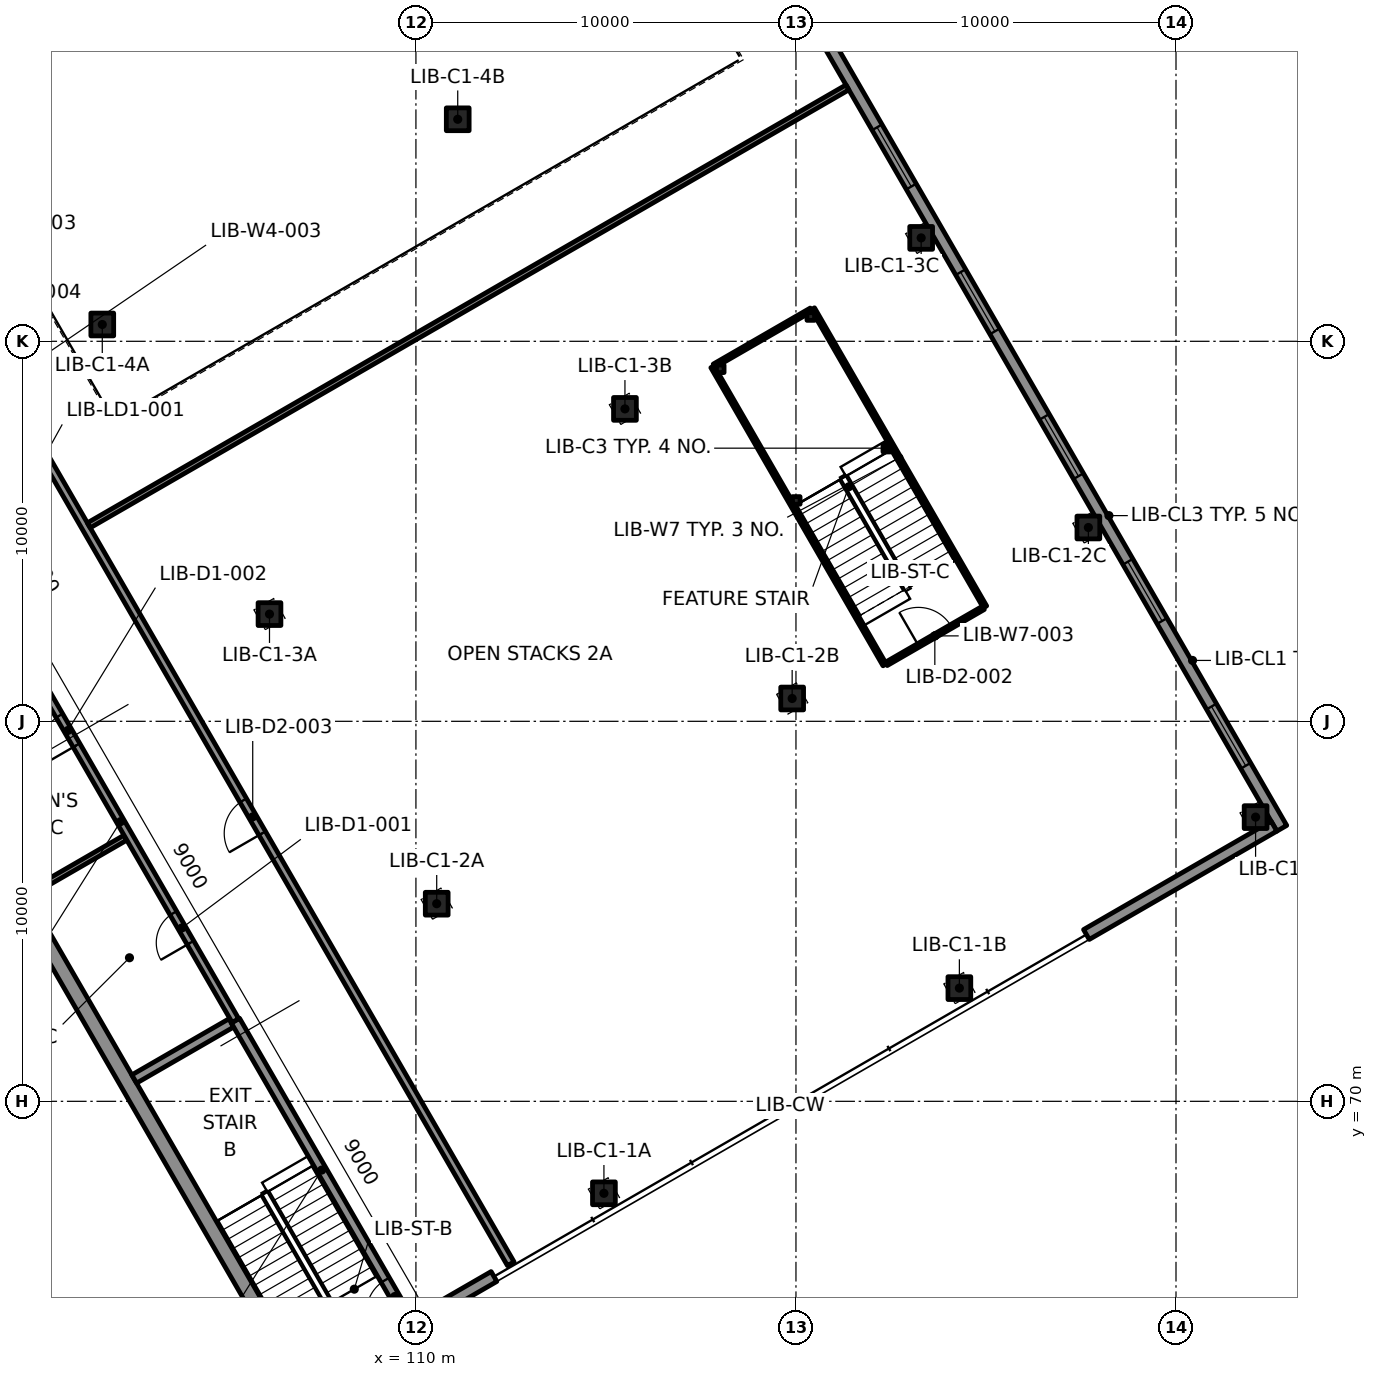
"""IFC4 building model, lengths in metres.
Left out: names, types, materials, properties, quantities, classifications, styles, units other than length and angle.
Written with IfcOpenShell. Run it as: python <this file> out.ifc"""

import sys

from ifc_helpers import new_model, si_unit, direction, frame, frame_2d, origin, origin_2d, place, context, subcontext, project, spatial, rectangle, extrude, element, fill, save


model = new_model("IFC4")
c1 = context("Model", 3, precision=1e-05, world=origin(), true_north=direction((0.0, 1.0)))
c2 = subcontext(c1, "Body", "Model", "MODEL_VIEW")
j1 = project(units=[si_unit("LENGTHUNIT", "METRE"), si_unit("PLANEANGLEUNIT", "RADIAN")], contexts=[c1])
p1 = place(None, origin())
s1 = spatial("IfcSite", under=j1, at=p1, CompositionType="ELEMENT")
p2 = place(p1, origin())
s2 = spatial("IfcBuilding", under=s1, at=p2, CompositionType="ELEMENT")
p3 = place(p2, frame((0.0, 0.0, 12.6)))
s3 = spatial("IfcBuildingStorey", under=s2, at=p3, CompositionType="ELEMENT", Elevation=12.6)
p4 = place(p3, frame((101.821, 68.315, -0.0), z_axis=(0.0, 0.0, 1.0), x_axis=(-0.5, 0.866025403784, 0.0)))
e1 = element("IfcColumn", 1, at=p4, inside=s3, PredefinedType="COLUMN", context=c2, shape_type="SweptSolid", body=[
    extrude(rectangle(XDim=1.2, YDim=1.5, at=origin_2d()), origin(), (0.0, 0.0, 1.0), 4.6),
])
p5 = place(p3, frame((103.019, 59.863, 0.0), z_axis=(0.0, 0.0, 1.0), x_axis=(-0.866027754727, 0.499995928025, 0.0)))
e2 = element("IfcWall", 2, at=p5, inside=s3, PredefinedType="PARTITIONING", context=c2, shape_type="SweptSolid", body=[
    extrude(rectangle(XDim=13.214, YDim=0.15, at=frame_2d((6.607, 0.0))), origin(), (0.0, 0.0, 1.0), 3.7),
])
for number, where, z_axis, x_axis in (
    (3, (114.947, 67.579, -0.36), (0.0, 0.0, 1.0), (1.0, 0.0, 0.0)),
    (4, (124.3, 72.979, -0.36), (0.0, 0.0, 1.0), (1.0, 0.0, 0.0)),
    (5, (132.094, 77.479, -0.36), (0.0, 0.0, 1.0), (1.0, 0.0, 0.0)),
    (6, (110.547, 75.2, -0.36), (0.0, 0.0, 1.0), (1.0, 0.0, 0.0)),
    (7, (119.9, 80.6, -0.36), (0.0, 0.0, 1.0), (1.0, 0.0, 0.0)),
    (8, (127.694, 85.1, -0.36), (0.0, 0.0, 1.0), (1.0, 0.0, 0.0)),
    (9, (106.147, 82.821, -0.36), (0.0, 0.0, 1.0), (1.0, 0.0, 0.0)),
    (10, (115.5, 88.221, -0.36), (0.0, 0.0, 1.0), (1.0, 0.0, 0.0)),
    (11, (123.294, 92.721, -0.36), (0.0, 0.0, 1.0), (1.0, 0.0, 0.0)),
    (12, (101.747, 90.442, -0.36), (0.0, 0.0, 1.0), (1.0, 0.0, 0.0)),
    (13, (111.1, 95.842, -0.36), (0.0, 0.0, 1.0), (1.0, 0.0, 0.0)),
):
    element("IfcColumn", number, at=place(p3, frame(where, z_axis=z_axis, x_axis=x_axis)), inside=s3, PredefinedType="COLUMN", context=c2, shape_type="SweptSolid", body=[
        extrude(rectangle(XDim=0.6, YDim=0.6, at=origin_2d()), origin(), (0.0, 0.0, 1.0), 4.6),
    ])
for number, where, z_axis, x_axis in (
    (14, (122.39, 87.188, -2.3), (0.0, 0.0, 1.0), (1.0, 0.0, 0.0)),
    (15, (120.008, 85.813, -2.3), (0.0, 0.0, 1.0), (1.0, 0.0, 0.0)),
    (16, (120.39, 90.652, -2.3), (0.0, 0.0, 1.0), (1.0, 0.0, 0.0)),
    (17, (118.008, 89.277, -2.3), (0.0, 0.0, 1.0), (1.0, 0.0, 0.0)),
):
    element("IfcColumn", number, at=place(p3, frame(where, z_axis=z_axis, x_axis=x_axis)), inside=s3, PredefinedType="COLUMN", context=c2, shape_type="SweptSolid", body=[
        extrude(rectangle(XDim=0.2, YDim=0.2, at=origin_2d()), origin(), (0.0, 0.0, 1.0), 4.4),
    ])
p6 = place(p3, frame((107.106, 62.36, 0.0), z_axis=(0.0, 0.0, 1.0), x_axis=(-0.49999992739, 0.866025445706, 0.0)))
e18 = element("IfcWall", 18, at=p6, inside=s3, PredefinedType="SOLIDWALL", context=c2, shape_type="SweptSolid", body=[
    extrude(rectangle(XDim=54.0, YDim=0.4, at=frame_2d((27.0, 0.0))), origin(), (0.0, 0.0, 1.0), 4.24),
])
p7 = place(p3, frame((132.784, 77.185, 0.0), z_axis=(0.0, 0.0, 1.0), x_axis=(-0.49999992739, 0.866025445706, 0.0)))
e19 = element("IfcWall", 19, at=p7, inside=s3, PredefinedType="SOLIDWALL", context=c2, shape_type="SweptSolid", body=[
    extrude(rectangle(XDim=54.0, YDim=0.3, at=frame_2d((27.0, 0.0))), origin(), (0.0, 0.0, 1.0), 4.24),
])
p8 = place(p7, frame((1.9, 0.0, 0.9)))
e20 = element("IfcOpeningElement", 20, at=p8, cuts=e19, PredefinedType="OPENING", context=c2, shape_type="SweptSolid", body=[
    extrude(rectangle(XDim=1.8, YDim=2.4, at=frame_2d((0.9, 1.2))), frame((0.0, 0.16, 0.0), z_axis=(0.0, -1.0, 0.0), x_axis=(1.0, 0.0, 0.0)), (0.0, 0.0, 1.0), 0.32),
])
p9 = place(p7, frame((6.3, 0.0, 0.9)))
e21 = element("IfcOpeningElement", 21, at=p9, cuts=e19, PredefinedType="OPENING", context=c2, shape_type="SweptSolid", body=[
    extrude(rectangle(XDim=1.8, YDim=2.4, at=frame_2d((0.9, 1.2))), frame((0.0, 0.16, 0.0), z_axis=(0.0, -1.0, 0.0), x_axis=(1.0, 0.0, 0.0)), (0.0, 0.0, 1.0), 0.32),
])
p10 = place(p7, frame((10.7, 0.0, 0.9)))
e22 = element("IfcOpeningElement", 22, at=p10, cuts=e19, PredefinedType="OPENING", context=c2, shape_type="SweptSolid", body=[
    extrude(rectangle(XDim=1.8, YDim=2.4, at=frame_2d((0.9, 1.2))), frame((0.0, 0.16, 0.0), z_axis=(0.0, -1.0, 0.0), x_axis=(1.0, 0.0, 0.0)), (0.0, 0.0, 1.0), 0.32),
])
p11 = place(p7, frame((15.1, 0.0, 0.9)))
e23 = element("IfcOpeningElement", 23, at=p11, cuts=e19, PredefinedType="OPENING", context=c2, shape_type="SweptSolid", body=[
    extrude(rectangle(XDim=1.8, YDim=2.4, at=frame_2d((0.9, 1.2))), frame((0.0, 0.16, 0.0), z_axis=(0.0, -1.0, 0.0), x_axis=(1.0, 0.0, 0.0)), (0.0, 0.0, 1.0), 0.32),
])
p12 = place(p7, frame((19.5, 0.0, 0.9)))
e24 = element("IfcOpeningElement", 24, at=p12, cuts=e19, PredefinedType="OPENING", context=c2, shape_type="SweptSolid", body=[
    extrude(rectangle(XDim=1.8, YDim=2.4, at=frame_2d((0.9, 1.2))), frame((0.0, 0.16, 0.0), z_axis=(0.0, -1.0, 0.0), x_axis=(1.0, 0.0, 0.0)), (0.0, 0.0, 1.0), 0.32),
])
p13 = place(p7, frame((23.9, 0.0, 0.9)))
e25 = element("IfcOpeningElement", 25, at=p13, cuts=e19, PredefinedType="OPENING", context=c2, shape_type="SweptSolid", body=[
    extrude(rectangle(XDim=1.8, YDim=2.4, at=frame_2d((0.9, 1.2))), frame((0.0, 0.16, 0.0), z_axis=(0.0, -1.0, 0.0), x_axis=(1.0, 0.0, 0.0)), (0.0, 0.0, 1.0), 0.32),
])
p14 = place(p7, frame((28.3, 0.0, 0.9)))
e26 = element("IfcOpeningElement", 26, at=p14, cuts=e19, PredefinedType="OPENING", context=c2, shape_type="SweptSolid", body=[
    extrude(rectangle(XDim=1.8, YDim=2.4, at=frame_2d((0.9, 1.2))), frame((0.0, 0.16, 0.0), z_axis=(0.0, -1.0, 0.0), x_axis=(1.0, 0.0, 0.0)), (0.0, 0.0, 1.0), 0.32),
])
p15 = place(p7, frame((32.7, 0.0, 0.9)))
e27 = element("IfcOpeningElement", 27, at=p15, cuts=e19, PredefinedType="OPENING", context=c2, shape_type="SweptSolid", body=[
    extrude(rectangle(XDim=1.8, YDim=2.4, at=frame_2d((0.9, 1.2))), frame((0.0, 0.16, 0.0), z_axis=(0.0, -1.0, 0.0), x_axis=(1.0, 0.0, 0.0)), (0.0, 0.0, 1.0), 0.32),
])
p16 = place(p7, frame((37.1, 0.0, 0.9)))
e28 = element("IfcOpeningElement", 28, at=p16, cuts=e19, PredefinedType="OPENING", context=c2, shape_type="SweptSolid", body=[
    extrude(rectangle(XDim=1.8, YDim=2.4, at=frame_2d((0.9, 1.2))), frame((0.0, 0.16, 0.0), z_axis=(0.0, -1.0, 0.0), x_axis=(1.0, 0.0, 0.0)), (0.0, 0.0, 1.0), 0.32),
])
p17 = place(p7, frame((50.3, 0.0, 0.9)))
e29 = element("IfcOpeningElement", 29, at=p17, cuts=e19, PredefinedType="OPENING", context=c2, shape_type="SweptSolid", body=[
    extrude(rectangle(XDim=1.8, YDim=2.4, at=frame_2d((0.9, 1.2))), frame((0.0, 0.16, 0.0), z_axis=(0.0, -1.0, 0.0), x_axis=(1.0, 0.0, 0.0)), (0.0, 0.0, 1.0), 0.32),
])
p18 = place(p3, frame((107.204, 62.59, 0.0), z_axis=(0.0, 0.0, 1.0), x_axis=(0.866045472092, 0.499965239061, 0.0)))
e30 = element("IfcWall", 30, at=p18, inside=s3, PredefinedType="SOLIDWALL", context=c2, shape_type="SweptSolid", body=[
    extrude(rectangle(XDim=5.6, YDim=0.3, at=frame_2d((2.8, 0.0))), origin(), (0.0, 0.0, 1.0), 4.24),
])
p19 = place(p3, frame((127.643, 74.389, 0.0), z_axis=(0.0, 0.0, 1.0), x_axis=(0.866025820012, 0.499999279071, 0.0)))
e31 = element("IfcWall", 31, at=p19, inside=s3, PredefinedType="SOLIDWALL", context=c2, shape_type="SweptSolid", body=[
    extrude(rectangle(XDim=5.7, YDim=0.3, at=frame_2d((2.85, 0.0))), origin(), (0.0, 0.0, 1.0), 4.24),
])
p20 = place(p3, frame((102.587, 70.587, 0.0), z_axis=(0.0, 0.0, 1.0), x_axis=(0.866039495442, 0.49997559174, 0.0)))
e32 = element("IfcWall", 32, at=p20, inside=s3, PredefinedType="SOLIDWALL", context=c2, shape_type="SweptSolid", body=[
    extrude(rectangle(XDim=2.95, YDim=0.25, at=frame_2d((1.475, 0.0))), origin(), (0.0, 0.0, 1.0), 4.24),
])
p21 = place(p3, frame((109.792, 64.257, 0.0), z_axis=(0.0, 0.0, 1.0), x_axis=(-0.499994616197, 0.866028512102, 0.0)))
e33 = element("IfcWall", 33, at=p21, inside=s3, PredefinedType="SOLIDWALL", context=c2, shape_type="SweptSolid", body=[
    extrude(rectangle(XDim=9.085, YDim=0.25, at=frame_2d((4.542, 0.0))), origin(), (0.0, 0.0, 1.0), 4.24),
])
p22 = place(p21, frame((0.2, 0.0, 0.0)))
e34 = element("IfcOpeningElement", 34, at=p22, cuts=e33, PredefinedType="OPENING", context=c2, shape_type="SweptSolid", body=[
    extrude(rectangle(XDim=1.0, YDim=2.1, at=frame_2d((0.5, 1.05))), frame((0.0, 0.135, 0.0), z_axis=(0.0, -1.0, 0.0), x_axis=(1.0, 0.0, 0.0)), (0.0, 0.0, 1.0), 0.27),
])
p23 = place(p3, frame((99.779, 75.45, 0.0), z_axis=(0.0, 0.0, 1.0), x_axis=(0.866017493347, 0.500013701029, 0.0)))
e35 = element("IfcWall", 35, at=p23, inside=s3, PredefinedType="PARTITIONING", context=c2, shape_type="SweptSolid", body=[
    extrude(rectangle(XDim=2.975, YDim=0.15, at=frame_2d((1.488, 0.0))), origin(), (0.0, 0.0, 1.0), 4.24),
])
p24 = place(p3, frame((105.25, 72.125, 0.0), z_axis=(0.0, 0.0, 1.0), x_axis=(-0.499996309931, 0.866027534236, 0.0)))
e36 = element("IfcWall", 36, at=p24, inside=s3, PredefinedType="PARTITIONING", context=c2, shape_type="SweptSolid", body=[
    extrude(rectangle(XDim=12.09, YDim=0.2, at=frame_2d((6.045, 0.0))), origin(), (0.0, 0.0, 1.0), 4.24),
])
p25 = place(p24, frame((2.365, 0.0, 0.0)))
e37 = element("IfcOpeningElement", 37, at=p25, cuts=e36, PredefinedType="OPENING", context=c2, shape_type="SweptSolid", body=[
    extrude(rectangle(XDim=0.9, YDim=2.1, at=frame_2d((0.45, 1.05))), frame((0.0, 0.11, 0.0), z_axis=(0.0, -1.0, 0.0), x_axis=(1.0, 0.0, 0.0)), (0.0, 0.0, 1.0), 0.22),
])
p26 = place(p24, frame((8.365, 0.0, 0.0)))
e38 = element("IfcOpeningElement", 38, at=p26, cuts=e36, PredefinedType="OPENING", context=c2, shape_type="SweptSolid", body=[
    extrude(rectangle(XDim=0.9, YDim=2.1, at=frame_2d((0.45, 1.05))), frame((0.0, 0.11, 0.0), z_axis=(0.0, -1.0, 0.0), x_axis=(1.0, 0.0, 0.0)), (0.0, 0.0, 1.0), 0.22),
])
p27 = place(p3, frame((112.496, 65.725, 0.0), z_axis=(0.0, 0.0, 1.0), x_axis=(-0.499998673217, 0.866026169802, 0.0)))
e39 = element("IfcWall", 39, at=p27, inside=s3, PredefinedType="PARTITIONING", context=c2, shape_type="SweptSolid", body=[
    extrude(rectangle(XDim=53.48, YDim=0.2, at=frame_2d((26.74, 0.0))), origin(), (0.0, 0.0, 1.0), 4.24),
])
p28 = place(p27, frame((13.08, 0.0, 0.0)))
e40 = element("IfcOpeningElement", 40, at=p28, cuts=e39, PredefinedType="OPENING", context=c2, shape_type="SweptSolid", body=[
    extrude(rectangle(XDim=1.0, YDim=2.1, at=frame_2d((0.5, 1.05))), frame((0.0, 0.11, 0.0), z_axis=(0.0, -1.0, 0.0), x_axis=(1.0, 0.0, 0.0)), (0.0, 0.0, 1.0), 0.22),
])
p29 = place(p27, frame((26.28, 0.0, 0.0)))
e41 = element("IfcOpeningElement", 41, at=p29, cuts=e39, PredefinedType="OPENING", context=c2, shape_type="SweptSolid", body=[
    extrude(rectangle(XDim=1.0, YDim=2.1, at=frame_2d((0.5, 1.05))), frame((0.0, 0.11, 0.0), z_axis=(0.0, -1.0, 0.0), x_axis=(1.0, 0.0, 0.0)), (0.0, 0.0, 1.0), 0.22),
])
p30 = place(p27, frame((43.88, 0.0, 0.0)))
e42 = element("IfcOpeningElement", 42, at=p30, cuts=e39, PredefinedType="OPENING", context=c2, shape_type="SweptSolid", body=[
    extrude(rectangle(XDim=1.0, YDim=2.1, at=frame_2d((0.5, 1.05))), frame((0.0, 0.11, 0.0), z_axis=(0.0, -1.0, 0.0), x_axis=(1.0, 0.0, 0.0)), (0.0, 0.0, 1.0), 0.22),
])
p31 = place(p27, frame((50.58, 0.0, 0.0)))
e43 = element("IfcOpeningElement", 43, at=p31, cuts=e39, PredefinedType="OPENING", context=c2, shape_type="SweptSolid", body=[
    extrude(rectangle(XDim=1.0, YDim=2.1, at=frame_2d((0.5, 1.05))), frame((0.0, 0.11, 0.0), z_axis=(0.0, -1.0, 0.0), x_axis=(1.0, 0.0, 0.0)), (0.0, 0.0, 1.0), 0.22),
])
p32 = place(p3, frame((101.392, 85.157, 0.0), z_axis=(0.0, 0.0, 1.0), x_axis=(0.866022961126, 0.500004230785, 0.0)))
e44 = element("IfcWall", 44, at=p32, inside=s3, PredefinedType="PARTITIONING", context=c2, shape_type="SweptSolid", body=[
    extrude(rectangle(XDim=23.05, YDim=0.15, at=frame_2d((11.525, 0.0))), origin(), (0.0, 0.0, 1.0), 4.24),
])
for number, where, z_axis, x_axis in (
    (45, (122.333, 81.486, 0.0), (0.0, 0.0, 1.0), (-0.5, 0.866, 0.0)),
    (46, (124.975, 83.01, 0.0), (0.0, 0.0, 1.0), (-0.5, 0.866, 0.0)),
):
    element("IfcWall", number, at=place(p3, frame(where, z_axis=z_axis, x_axis=x_axis)), inside=s3, PredefinedType="PARTITIONING", context=c2, shape_type="SweptSolid", body=[
        extrude(rectangle(XDim=9.06, YDim=0.1, at=frame_2d((4.53, 0.0))), origin(), (0.0, 0.0, 1.0), 4.24),
    ])
p33 = place(p3, frame((122.377, 81.51, 0.0), z_axis=(0.0, 0.0, 1.0), x_axis=(0.866003658127, 0.500037662692, 0.0)))
e47 = element("IfcWall", 47, at=p33, inside=s3, PredefinedType="PARTITIONING", context=c2, shape_type="SweptSolid", body=[
    extrude(rectangle(XDim=2.95, YDim=0.1, at=frame_2d((1.475, 0.0))), origin(), (0.0, 0.0, 1.0), 4.24),
])
p34 = place(p33, frame((0.975, 0.0, 0.0)))
e48 = element("IfcOpeningElement", 48, at=p34, cuts=e47, PredefinedType="OPENING", context=c2, shape_type="SweptSolid", body=[
    extrude(rectangle(XDim=1.0, YDim=2.1, at=frame_2d((0.5, 1.05))), frame((0.0, 0.06, 0.0), z_axis=(0.0, -1.0, 0.0), x_axis=(1.0, 0.0, 0.0)), (0.0, 0.0, 1.0), 0.12),
])
p35 = place(p3, frame((117.847, 89.357, 0.0), z_axis=(0.0, 0.0, 1.0), x_axis=(0.866003658127, 0.500037662692, 0.0)))
e49 = element("IfcWall", 49, at=p35, inside=s3, PredefinedType="PARTITIONING", context=c2, shape_type="SweptSolid", body=[
    extrude(rectangle(XDim=2.95, YDim=0.1, at=frame_2d((1.475, 0.0))), origin(), (0.0, 0.0, 1.0), 4.24),
])
p36 = place(p8, origin())
e50 = element("IfcWindow", 50, at=p36, inside=s3, PartitioningType="SINGLE_PANEL", PredefinedType="WINDOW", context=c2, shape_type="SweptSolid", body=[
    extrude(rectangle(XDim=1.8, YDim=2.4, at=frame_2d((0.9, 1.2))), frame((0.0, 0.03, 0.0), z_axis=(0.0, -1.0, 0.0), x_axis=(1.0, 0.0, 0.0)), (0.0, 0.0, 1.0), 0.06),
])
fill(e20, e50)
p37 = place(p9, origin())
e51 = element("IfcWindow", 51, at=p37, inside=s3, PartitioningType="SINGLE_PANEL", PredefinedType="WINDOW", context=c2, shape_type="SweptSolid", body=[
    extrude(rectangle(XDim=1.8, YDim=2.4, at=frame_2d((0.9, 1.2))), frame((0.0, 0.03, 0.0), z_axis=(0.0, -1.0, 0.0), x_axis=(1.0, 0.0, 0.0)), (0.0, 0.0, 1.0), 0.06),
])
fill(e21, e51)
p38 = place(p10, origin())
e52 = element("IfcWindow", 52, at=p38, inside=s3, PartitioningType="SINGLE_PANEL", PredefinedType="WINDOW", context=c2, shape_type="SweptSolid", body=[
    extrude(rectangle(XDim=1.8, YDim=2.4, at=frame_2d((0.9, 1.2))), frame((0.0, 0.03, 0.0), z_axis=(0.0, -1.0, 0.0), x_axis=(1.0, 0.0, 0.0)), (0.0, 0.0, 1.0), 0.06),
])
fill(e22, e52)
p39 = place(p11, origin())
e53 = element("IfcWindow", 53, at=p39, inside=s3, PartitioningType="SINGLE_PANEL", PredefinedType="WINDOW", context=c2, shape_type="SweptSolid", body=[
    extrude(rectangle(XDim=1.8, YDim=2.4, at=frame_2d((0.9, 1.2))), frame((0.0, 0.03, 0.0), z_axis=(0.0, -1.0, 0.0), x_axis=(1.0, 0.0, 0.0)), (0.0, 0.0, 1.0), 0.06),
])
fill(e23, e53)
p40 = place(p12, origin())
e54 = element("IfcWindow", 54, at=p40, inside=s3, PartitioningType="SINGLE_PANEL", PredefinedType="WINDOW", context=c2, shape_type="SweptSolid", body=[
    extrude(rectangle(XDim=1.8, YDim=2.4, at=frame_2d((0.9, 1.2))), frame((0.0, 0.03, 0.0), z_axis=(0.0, -1.0, 0.0), x_axis=(1.0, 0.0, 0.0)), (0.0, 0.0, 1.0), 0.06),
])
fill(e24, e54)
p41 = place(p22, origin())
e55 = element("IfcDoor", 55, at=p41, inside=s3, OperationType="SINGLE_SWING_LEFT", PredefinedType="DOOR", context=c2, shape_type="SweptSolid", body=[
    extrude(rectangle(XDim=1.0, YDim=2.1, at=frame_2d((0.5, 1.05))), frame((0.0, 0.025, 0.0), z_axis=(0.0, -1.0, 0.0), x_axis=(1.0, 0.0, 0.0)), (0.0, 0.0, 1.0), 0.05),
])
fill(e34, e55)
p42 = place(p25, origin())
e56 = element("IfcDoor", 56, at=p42, inside=s3, OperationType="SINGLE_SWING_LEFT", PredefinedType="DOOR", context=c2, shape_type="SweptSolid", body=[
    extrude(rectangle(XDim=0.9, YDim=2.1, at=frame_2d((0.45, 1.05))), frame((0.0, 0.025, 0.0), z_axis=(0.0, -1.0, 0.0), x_axis=(1.0, 0.0, 0.0)), (0.0, 0.0, 1.0), 0.05),
])
fill(e37, e56)
p43 = place(p26, origin())
e57 = element("IfcDoor", 57, at=p43, inside=s3, OperationType="SINGLE_SWING_RIGHT", PredefinedType="DOOR", context=c2, shape_type="SweptSolid", body=[
    extrude(rectangle(XDim=0.9, YDim=2.1, at=frame_2d((0.45, 1.05))), frame((0.0, 0.025, 0.0), z_axis=(0.0, -1.0, 0.0), x_axis=(1.0, 0.0, 0.0)), (0.0, 0.0, 1.0), 0.05),
])
fill(e38, e57)
p44 = place(p34, origin())
e58 = element("IfcDoor", 58, at=p44, inside=s3, OperationType="SINGLE_SWING_RIGHT", PredefinedType="DOOR", context=c2, shape_type="SweptSolid", body=[
    extrude(rectangle(XDim=1.0, YDim=2.1, at=frame_2d((0.5, 1.05))), frame((0.0, 0.025, 0.0), z_axis=(0.0, -1.0, 0.0), x_axis=(1.0, 0.0, 0.0)), (0.0, 0.0, 1.0), 0.05),
])
fill(e48, e58)
p45 = place(p28, origin())
e59 = element("IfcDoor", 59, at=p45, inside=s3, OperationType="SINGLE_SWING_LEFT", PredefinedType="DOOR", context=c2, shape_type="SweptSolid", body=[
    extrude(rectangle(XDim=1.0, YDim=2.1, at=frame_2d((0.5, 1.05))), frame((0.0, 0.025, 0.0), z_axis=(0.0, -1.0, 0.0), x_axis=(1.0, 0.0, 0.0)), (0.0, 0.0, 1.0), 0.05),
])
fill(e40, e59)
save(model, sys.argv[1])
